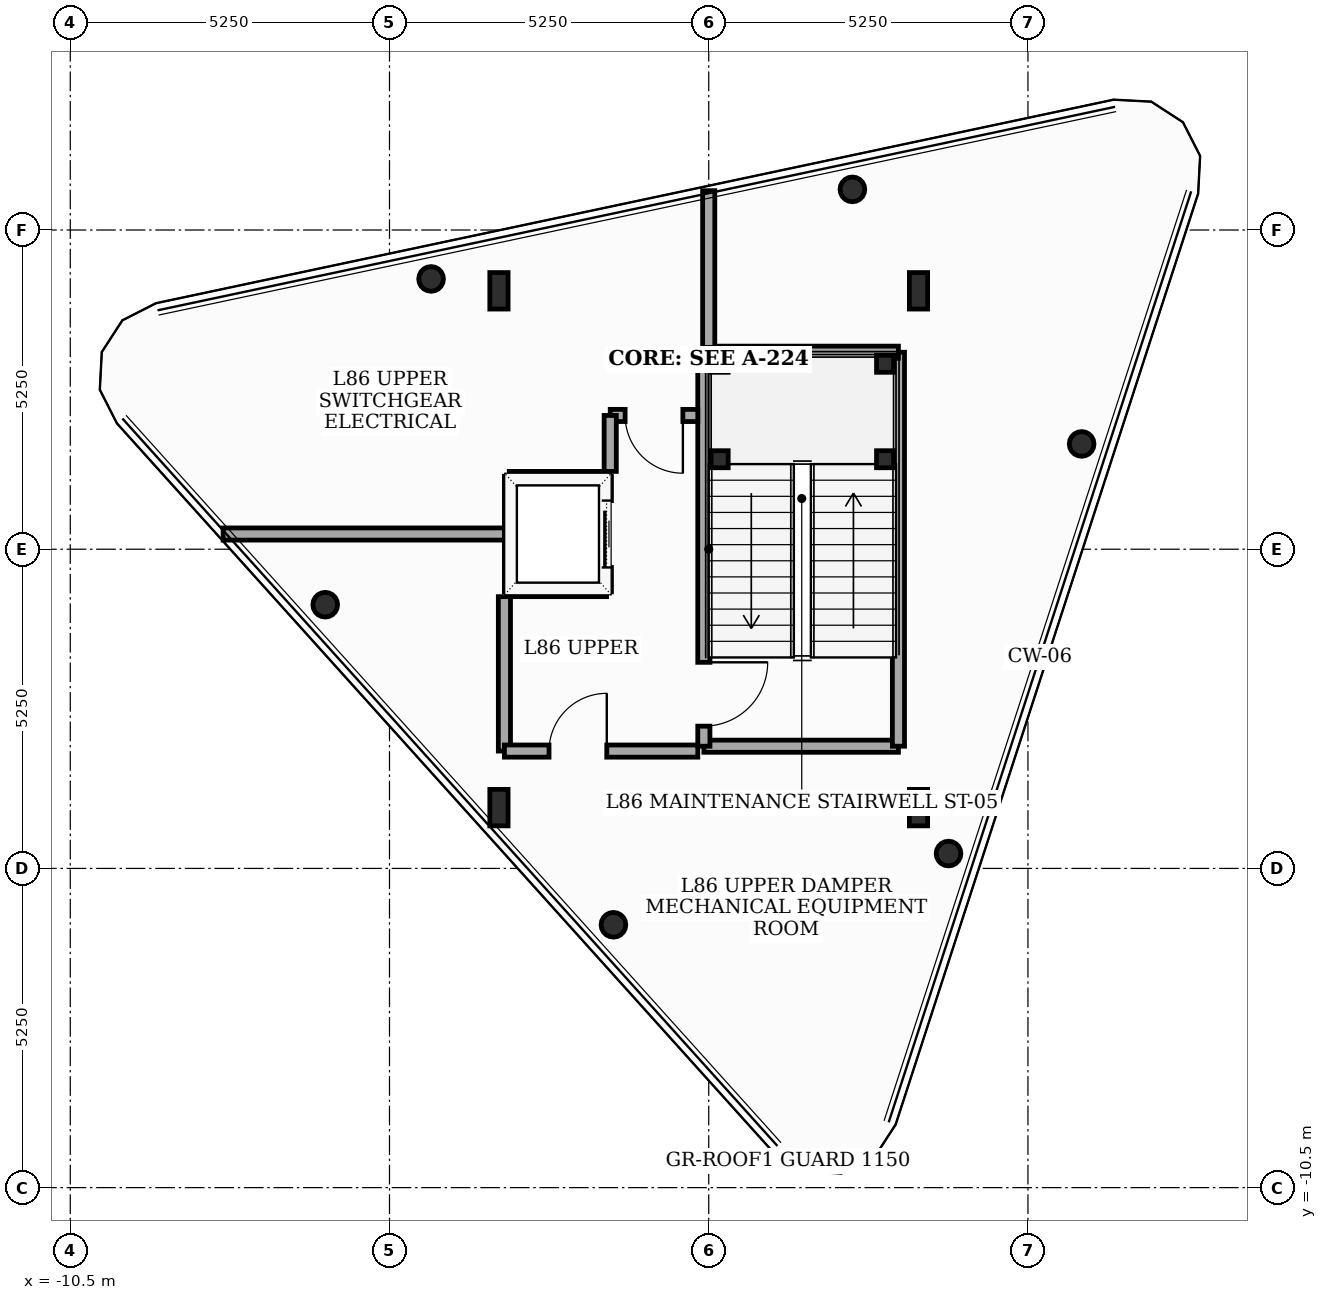
"""IFC4 building model, lengths in metres.
Left out: names, types, materials, properties, quantities, classifications, styles, units other than length and angle.
Written with IfcOpenShell. Run it as: python <this file> out.ifc"""

import sys

from ifc_helpers import new_model, si_unit, direction, frame, frame_2d, origin, origin_2d, place, context, subcontext, project, spatial, rectangle, hollow_circle, i_section, extrude, element, fill, save


model = new_model("IFC4")
c1 = context("Model", 3, precision=1e-05, world=origin(), true_north=direction((0.0, 1.0)))
c2 = subcontext(c1, "Body", "Model", "MODEL_VIEW")
j1 = project(units=[si_unit("LENGTHUNIT", "METRE"), si_unit("PLANEANGLEUNIT", "RADIAN")], contexts=[c1])
p1 = place(None, origin())
s1 = spatial("IfcSite", under=j1, at=p1, CompositionType="ELEMENT")
p2 = place(p1, origin())
s2 = spatial("IfcBuilding", under=s1, at=p2, CompositionType="ELEMENT")
p3 = place(p2, frame((0.0, 0.0, 335.0)))
s3 = spatial("IfcBuildingStorey", under=s2, at=p3, CompositionType="ELEMENT", Elevation=335.0)
for number, where, z_axis, x_axis in (
    (1, (-3.45, -4.25, 0.0), (0.0, 0.0, 1.0), (1.0, 0.0, 0.0)),
    (2, (3.45, -4.25, 0.0), (0.0, 0.0, 1.0), (1.0, 0.0, 0.0)),
    (3, (3.45, 4.25, 0.0), (0.0, 0.0, 1.0), (1.0, 0.0, 0.0)),
    (4, (-3.45, 4.25, 0.0), (0.0, 0.0, 1.0), (1.0, 0.0, 0.0)),
):
    element("IfcColumn", number, at=place(p3, frame(where, z_axis=z_axis, x_axis=x_axis)), inside=s3, PredefinedType="COLUMN", context=c2, shape_type="SweptSolid", body=[
        extrude(i_section(OverallWidth=0.3, OverallDepth=0.6, WebThickness=0.015, FlangeThickness=0.03, at=origin_2d()), origin(), (0.0, 0.0, 1.0), 4.2),
    ])
for number, where, z_axis, x_axis in (
    (5, (3.944, -5.006, 0.0), (0.0, 0.0, 1.0), (0.309, 0.951, 0.0)),
    (6, (6.133, 1.732, 0.0), (0.0, 0.0, 1.0), (0.309, 0.951, 0.0)),
    (7, (2.363, 5.918, 0.0), (0.0, 0.0, 1.0), (0.309, 0.951, 0.0)),
    (8, (-4.566, 4.446, 0.0), (0.0, 0.0, 1.0), (0.309, 0.951, 0.0)),
    (9, (-6.307, -0.913, 0.0), (0.0, 0.0, 1.0), (0.309, 0.951, 0.0)),
    (10, (-1.567, -6.177, 0.0), (0.0, 0.0, 1.0), (0.309, 0.951, 0.0)),
):
    element("IfcColumn", number, at=place(p3, frame(where, z_axis=z_axis, x_axis=x_axis)), inside=s3, PredefinedType="COLUMN", context=c2, shape_type="SweptSolid", body=[
        extrude(hollow_circle(Radius=0.203, WallThickness=0.02, at=origin_2d()), origin(), (0.0, 0.0, 1.0), 4.2),
    ])
for number, where, z_axis, x_axis in (
    (11, (0.18, 1.48, 0.0), (0.0, 0.0, 1.0), (1.0, 0.0, 0.0)),
    (12, (2.9, 1.48, 0.0), (0.0, 0.0, 1.0), (1.0, 0.0, 0.0)),
    (13, (0.18, 3.05, 0.0), (0.0, 0.0, 1.0), (1.0, 0.0, 0.0)),
    (14, (2.9, 3.05, 0.0), (0.0, 0.0, 1.0), (1.0, 0.0, 0.0)),
):
    element("IfcColumn", number, at=place(p3, frame(where, z_axis=z_axis, x_axis=x_axis)), inside=s3, PredefinedType="PILASTER", context=c2, shape_type="SweptSolid", body=[
        extrude(i_section(OverallWidth=0.28, OverallDepth=0.28, WebThickness=0.01, FlangeThickness=0.018, at=origin_2d()), origin(), (0.0, 0.0, 1.0), 4.2),
    ])
p4 = place(p3, frame((-0.08, -3.24, 0.0), z_axis=(0.0, 0.0, 1.0), x_axis=(1.0, 0.0, 0.0)))
e15 = element("IfcWall", 15, at=p4, inside=s3, PredefinedType="SOLIDWALL", context=c2, shape_type="SweptSolid", body=[
    extrude(rectangle(XDim=3.2, YDim=0.2, at=frame_2d((1.6, 0.0))), origin(), (0.0, 0.0, 1.0), 2.565),
])
p5 = place(p3, frame((3.12, -3.24, 0.0), z_axis=(0.0, 0.0, 1.0), x_axis=(0.0, 1.0, 0.0)))
e16 = element("IfcWall", 16, at=p5, inside=s3, PredefinedType="SOLIDWALL", context=c2, shape_type="SweptSolid", body=[
    extrude(rectangle(XDim=6.48, YDim=0.2, at=frame_2d((3.24, 0.0))), origin(), (0.0, 0.0, 1.0), 2.565),
])
p6 = place(p3, frame((3.12, 3.24, 0.0), z_axis=(0.0, 0.0, 1.0), x_axis=(-1.0, 0.0, 0.0)))
e17 = element("IfcWall", 17, at=p6, inside=s3, PredefinedType="SOLIDWALL", context=c2, shape_type="SweptSolid", body=[
    extrude(rectangle(XDim=3.2, YDim=0.2, at=frame_2d((1.6, 0.0))), origin(), (0.0, 0.0, 1.0), 3.98),
])
p7 = place(p3, frame((-0.08, 3.24, 0.0), z_axis=(0.0, 0.0, 1.0), x_axis=(0.0, -1.0, 0.0)))
e18 = element("IfcWall", 18, at=p7, inside=s3, PredefinedType="SOLIDWALL", context=c2, shape_type="SweptSolid", body=[
    extrude(rectangle(XDim=6.48, YDim=0.2, at=frame_2d((3.24, 0.0))), origin(), (0.0, 0.0, 1.0), 3.98),
])
p8 = place(p7, frame((5.1, 0.0, 0.0)))
e19 = element("IfcOpeningElement", 19, at=p8, cuts=e18, PredefinedType="OPENING", context=c2, shape_type="SweptSolid", body=[
    extrude(rectangle(XDim=1.05, YDim=2.15, at=frame_2d((0.525, 1.075))), frame((0.0, 0.11, 0.0), z_axis=(0.0, -1.0, 0.0), x_axis=(1.0, 0.0, 0.0)), (0.0, 0.0, 1.0), 0.22),
])
p9 = place(p3, frame((-3.28, -0.7, 0.0), z_axis=(0.0, 0.0, 1.0), x_axis=(0.0, 1.0, 0.0)))
e20 = element("IfcWall", 20, at=p9, inside=s3, PredefinedType="SOLIDWALL", context=c2, shape_type="SweptSolid", body=[
    extrude(rectangle(XDim=1.9, YDim=0.16, at=frame_2d((0.95, 0.0))), origin(), (0.0, 0.0, 1.0), 2.565),
])
for number, where, z_axis, x_axis in (
    (21, (-3.28, 1.2, 0.0), (0.0, 0.0, 1.0), (1.0, 0.0, 0.0)),
    (22, (-1.68, -0.7, 0.0), (0.0, 0.0, 1.0), (-1.0, 0.0, 0.0)),
):
    element("IfcWall", number, at=place(p3, frame(where, z_axis=z_axis, x_axis=x_axis)), inside=s3, PredefinedType="SOLIDWALL", context=c2, shape_type="SweptSolid", body=[
        extrude(rectangle(XDim=1.6, YDim=0.16, at=frame_2d((0.8, 0.0))), origin(), (0.0, 0.0, 1.0), 2.565),
    ])
p10 = place(p3, frame((-1.68, -0.7, 0.0), z_axis=(0.0, 0.0, 1.0), x_axis=(0.0, 1.0, 0.0)))
e23 = element("IfcWall", 23, at=p10, inside=s3, PredefinedType="SOLIDWALL", context=c2, shape_type="SweptSolid", body=[
    extrude(rectangle(XDim=1.9, YDim=0.16, at=frame_2d((0.95, 0.0))), origin(), (0.0, 0.0, 1.0), 3.98),
])
p11 = place(p10, frame((0.4, 0.0, 0.0)))
e24 = element("IfcOpeningElement", 24, at=p11, cuts=e23, PredefinedType="OPENING", context=c2, shape_type="SweptSolid", body=[
    extrude(rectangle(XDim=1.1, YDim=2.1, at=frame_2d((0.55, 1.05))), frame((0.0, 0.09, 0.0), z_axis=(0.0, -1.0, 0.0), x_axis=(1.0, 0.0, 0.0)), (0.0, 0.0, 1.0), 0.18),
])
p12 = place(p3, frame((-3.36, -0.78, 0.0), z_axis=(0.0, 0.0, 1.0), x_axis=(0.0, -1.0, 0.0)))
e25 = element("IfcWall", 25, at=p12, inside=s3, PredefinedType="SOLIDWALL", context=c2, shape_type="SweptSolid", body=[
    extrude(rectangle(XDim=2.54, YDim=0.2, at=frame_2d((1.27, 0.0))), origin(), (0.0, 0.0, 1.0), 2.565),
])
p13 = place(p3, frame((-3.36, -3.32, 0.0), z_axis=(0.0, 0.0, 1.0), x_axis=(1.0, 0.0, 0.0)))
e26 = element("IfcWall", 26, at=p13, inside=s3, PredefinedType="SOLIDWALL", context=c2, shape_type="SweptSolid", body=[
    extrude(rectangle(XDim=3.18, YDim=0.2, at=frame_2d((1.59, 0.0))), origin(), (0.0, 0.0, 1.0), 2.565),
])
p14 = place(p13, frame((0.733, 0.0, 0.0)))
e27 = element("IfcOpeningElement", 27, at=p14, cuts=e26, PredefinedType="OPENING", context=c2, shape_type="SweptSolid", body=[
    extrude(rectangle(XDim=0.95, YDim=2.1, at=frame_2d((0.475, 1.05))), frame((0.0, 0.11, 0.0), z_axis=(0.0, -1.0, 0.0), x_axis=(1.0, 0.0, 0.0)), (0.0, 0.0, 1.0), 0.22),
])
p15 = place(p3, frame((-0.18, 2.2, 0.0), z_axis=(0.0, 0.0, 1.0), x_axis=(-1.0, 0.0, 0.0)))
e28 = element("IfcWall", 28, at=p15, inside=s3, PredefinedType="SOLIDWALL", context=c2, shape_type="SweptSolid", body=[
    extrude(rectangle(XDim=1.44, YDim=0.2, at=frame_2d((0.72, 0.0))), origin(), (0.0, 0.0, 1.0), 3.98),
])
p16 = place(p15, frame((0.245, 0.0, 0.0)))
e29 = element("IfcOpeningElement", 29, at=p16, cuts=e28, PredefinedType="OPENING", context=c2, shape_type="SweptSolid", body=[
    extrude(rectangle(XDim=0.95, YDim=2.1, at=frame_2d((0.475, 1.05))), frame((0.0, 0.11, 0.0), z_axis=(0.0, -1.0, 0.0), x_axis=(1.0, 0.0, 0.0)), (0.0, 0.0, 1.0), 0.22),
])
p17 = place(p3, frame((-1.62, 2.2, 0.0), z_axis=(0.0, 0.0, 1.0), x_axis=(0.0, -1.0, 0.0)))
e30 = element("IfcWall", 30, at=p17, inside=s3, PredefinedType="SOLIDWALL", context=c2, shape_type="SweptSolid", body=[
    extrude(rectangle(XDim=0.92, YDim=0.2, at=frame_2d((0.46, 0.0))), origin(), (0.0, 0.0, 1.0), 3.98),
])
p18 = place(p3, frame((-3.36, 0.25, 0.0), z_axis=(0.0, 0.0, 1.0), x_axis=(-1.0, 0.0, 0.0)))
e31 = element("IfcWall", 31, at=p18, inside=s3, PredefinedType="SOLIDWALL", context=c2, shape_type="SweptSolid", body=[
    extrude(rectangle(XDim=4.626, YDim=0.2, at=frame_2d((2.313, 0.0))), origin(), (0.0, 0.0, 1.0), 2.565),
])
p19 = place(p3, frame((0.0, 5.896, 0.0), z_axis=(0.0, 0.0, 1.0), x_axis=(0.0, -1.0, 0.0)))
e32 = element("IfcWall", 32, at=p19, inside=s3, PredefinedType="SOLIDWALL", context=c2, shape_type="SweptSolid", body=[
    extrude(rectangle(XDim=2.576, YDim=0.2, at=frame_2d((1.288, 0.0))), origin(), (0.0, 0.0, 1.0), 2.565),
])
p20 = place(p8, origin())
e33 = element("IfcDoor", 33, at=p20, inside=s3, OperationType="SINGLE_SWING_LEFT", PredefinedType="DOOR", context=c2, shape_type="SweptSolid", body=[
    extrude(rectangle(XDim=1.05, YDim=2.15, at=frame_2d((0.525, 1.075))), frame((0.0, 0.025, 0.0), z_axis=(0.0, -1.0, 0.0), x_axis=(1.0, 0.0, 0.0)), (0.0, 0.0, 1.0), 0.05),
])
fill(e19, e33)
p21 = place(p11, origin())
e34 = element("IfcDoor", 34, at=p21, inside=s3, OperationType="SLIDING_TO_LEFT", PredefinedType="DOOR", context=c2, shape_type="SweptSolid", body=[
    extrude(rectangle(XDim=1.1, YDim=2.1, at=frame_2d((0.55, 1.05))), frame((0.0, 0.025, 0.0), z_axis=(0.0, -1.0, 0.0), x_axis=(1.0, 0.0, 0.0)), (0.0, 0.0, 1.0), 0.05),
])
fill(e24, e34)
p22 = place(p14, origin())
e35 = element("IfcDoor", 35, at=p22, inside=s3, OperationType="SINGLE_SWING_RIGHT", PredefinedType="DOOR", context=c2, shape_type="SweptSolid", body=[
    extrude(rectangle(XDim=0.95, YDim=2.1, at=frame_2d((0.475, 1.05))), frame((0.0, 0.025, 0.0), z_axis=(0.0, -1.0, 0.0), x_axis=(1.0, 0.0, 0.0)), (0.0, 0.0, 1.0), 0.05),
])
fill(e27, e35)
p23 = place(p16, origin())
e36 = element("IfcDoor", 36, at=p23, inside=s3, OperationType="SINGLE_SWING_LEFT", PredefinedType="DOOR", context=c2, shape_type="SweptSolid", body=[
    extrude(rectangle(XDim=0.95, YDim=2.1, at=frame_2d((0.475, 1.05))), frame((0.0, 0.025, 0.0), z_axis=(0.0, -1.0, 0.0), x_axis=(1.0, 0.0, 0.0)), (0.0, 0.0, 1.0), 0.05),
])
fill(e29, e36)
save(model, sys.argv[1])
